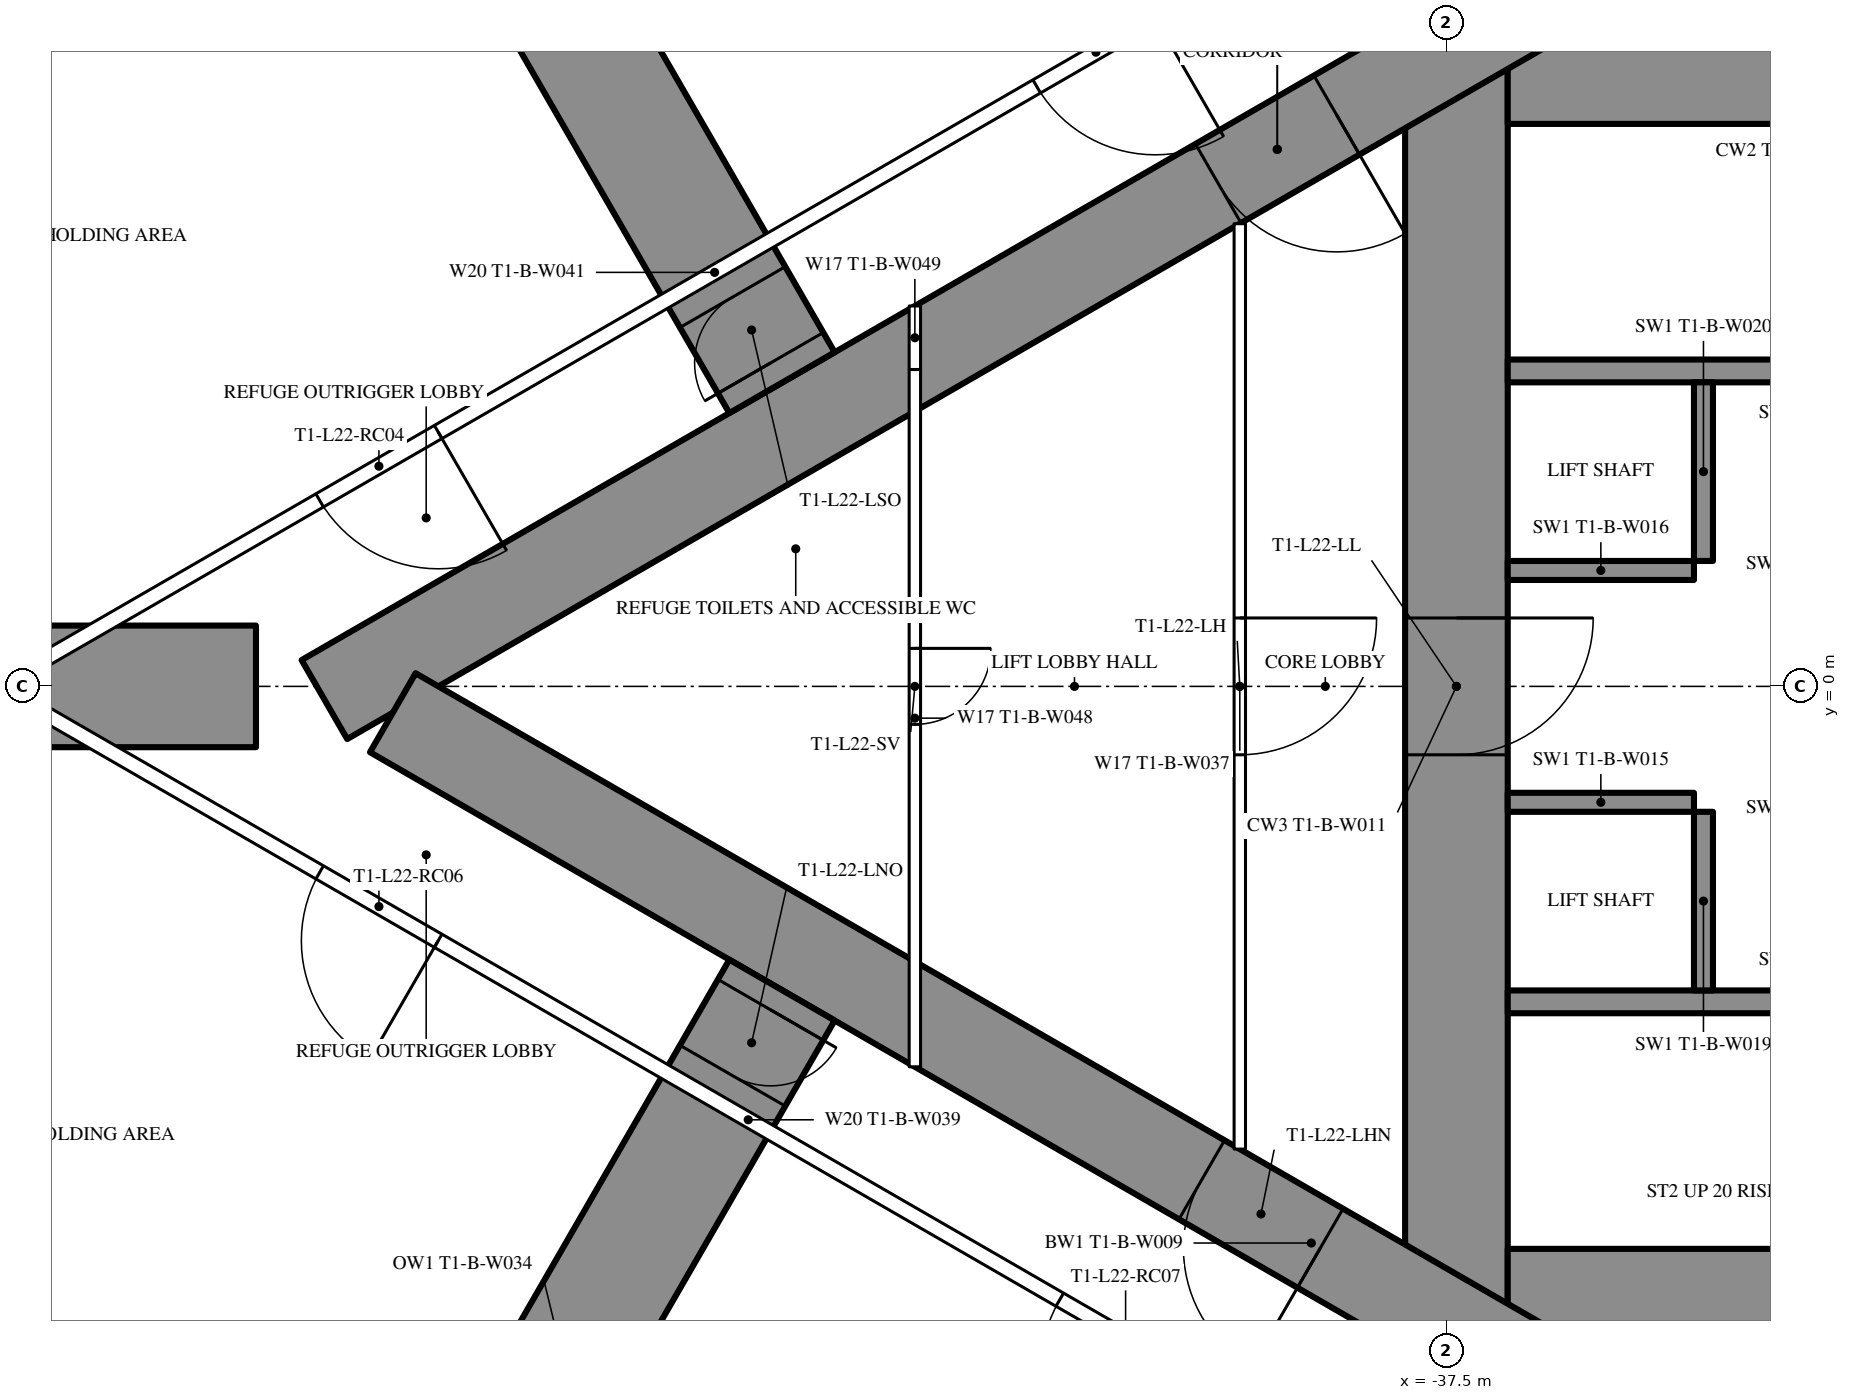
"""IFC4 building model, lengths in metres.
Left out: names, types, materials, properties, quantities, classifications, styles, units other than length and angle.
Written with IfcOpenShell. Run it as: python <this file> out.ifc"""

import sys

from ifc_helpers import new_model, si_unit, direction, frame, frame_2d, origin, place, context, subcontext, project, spatial, rectangle, extrude, element, fill, save


model = new_model("IFC4")
c1 = context("Model", 3, precision=1e-05, world=origin(), true_north=direction((0.0, 1.0)))
c2 = subcontext(c1, "Body", "Model", "MODEL_VIEW")
j1 = project(units=[si_unit("LENGTHUNIT", "METRE"), si_unit("PLANEANGLEUNIT", "RADIAN")], contexts=[c1])
p1 = place(None, origin())
s1 = spatial("IfcSite", under=j1, at=p1, CompositionType="ELEMENT")
p2 = place(p1, origin())
s2 = spatial("IfcBuilding", under=s1, at=p2, CompositionType="ELEMENT")
p3 = place(p2, frame((0.0, 0.0, 87.0)))
s3 = spatial("IfcBuildingStorey", under=s2, at=p3, CompositionType="ELEMENT", Elevation=87.0)
p4 = place(p3, frame((-37.375, 8.6, 0.0), z_axis=(0.0, 0.0, 1.0), x_axis=(0.0, -1.0, 0.0)))
e1 = element("IfcWall", 1, at=p4, inside=s3, PredefinedType="SHEAR", context=c2, shape_type="SweptSolid", body=[
    extrude(rectangle(XDim=17.2, YDim=1.35, at=frame_2d((8.6, 0.0))), origin(), (0.0, 0.0, 1.0), 3.6),
])
p5 = place(p4, frame((7.7, 0.0, 0.0)))
e2 = element("IfcOpeningElement", 2, at=p5, cuts=e1, PredefinedType="OPENING", context=c2, shape_type="SweptSolid", body=[
    extrude(rectangle(XDim=1.8, YDim=2.2, at=frame_2d((0.9, 1.1))), frame((0.0, 0.685, 0.0), z_axis=(0.0, -1.0, 0.0), x_axis=(1.0, 0.0, 0.0)), (0.0, 0.0, 1.0), 1.37),
])
p6 = place(p3, frame((-28.3, 8.0, 0.0), z_axis=(0.0, 0.0, 1.0), x_axis=(-1.0, 0.0, 0.0)))
e3 = element("IfcWall", 3, at=p6, inside=s3, PredefinedType="SHEAR", context=c2, shape_type="SweptSolid", body=[
    extrude(rectangle(XDim=8.4, YDim=1.2, at=frame_2d((4.2, 0.0))), origin(), (0.0, 0.0, 1.0), 3.6),
])
p7 = place(p6, frame((0.25, 0.0, 0.0)))
e4 = element("IfcOpeningElement", 4, at=p7, cuts=e3, PredefinedType="OPENING", context=c2, shape_type="SweptSolid", body=[
    extrude(rectangle(XDim=1.0, YDim=2.2, at=frame_2d((0.5, 1.1))), frame((0.0, 0.61, 0.0), z_axis=(0.0, -1.0, 0.0), x_axis=(1.0, 0.0, 0.0)), (0.0, 0.0, 1.0), 1.22),
])
p8 = place(p3, frame((-28.3, -8.0, 0.0), z_axis=(0.0, 0.0, 1.0), x_axis=(-1.0, 0.0, 0.0)))
e5 = element("IfcWall", 5, at=p8, inside=s3, PredefinedType="SHEAR", context=c2, shape_type="SweptSolid", body=[
    extrude(rectangle(XDim=8.4, YDim=1.2, at=frame_2d((4.2, 0.0))), origin(), (0.0, 0.0, 1.0), 3.6),
])
p9 = place(p8, frame((0.25, 0.0, 0.0)))
e6 = element("IfcOpeningElement", 6, at=p9, cuts=e5, PredefinedType="OPENING", context=c2, shape_type="SweptSolid", body=[
    extrude(rectangle(XDim=1.0, YDim=2.2, at=frame_2d((0.5, 1.1))), frame((0.0, 0.61, 0.0), z_axis=(0.0, -1.0, 0.0), x_axis=(1.0, 0.0, 0.0)), (0.0, 0.0, 1.0), 1.22),
])
for number, where, z_axis, x_axis in (
    (7, (-28.3, 4.15, 0.0), (0.0, 0.0, 1.0), (-1.0, 0.0, 0.0)),
    (8, (-28.3, -4.15, 0.0), (0.0, 0.0, 1.0), (-1.0, 0.0, 0.0)),
):
    element("IfcWall", number, at=place(p3, frame(where, z_axis=z_axis, x_axis=x_axis)), inside=s3, PredefinedType="SHEAR", context=c2, shape_type="SweptSolid", body=[
        extrude(rectangle(XDim=8.4, YDim=0.3, at=frame_2d((4.2, 0.0))), origin(), (0.0, 0.0, 1.0), 3.6),
    ])
p10 = place(p3, frame((-34.125, 4.0, 0.0), z_axis=(0.0, 0.0, 1.0), x_axis=(0.0, -1.0, 0.0)))
e9 = element("IfcWall", 9, at=p10, inside=s3, PredefinedType="SHEAR", context=c2, shape_type="SweptSolid", body=[
    extrude(rectangle(XDim=2.35, YDim=0.25, at=frame_2d((1.175, 0.0))), origin(), (0.0, 0.0, 1.0), 3.6),
])
p11 = place(p3, frame((-34.25, 1.525, 0.0), z_axis=(0.0, 0.0, 1.0), x_axis=(-1.0, 0.0, 0.0)))
e10 = element("IfcWall", 10, at=p11, inside=s3, PredefinedType="SHEAR", context=c2, shape_type="SweptSolid", body=[
    extrude(rectangle(XDim=2.45, YDim=0.25, at=frame_2d((1.225, 0.0))), origin(), (0.0, 0.0, 1.0), 3.6),
])
p12 = place(p3, frame((-34.125, -1.65, 0.0), z_axis=(0.0, 0.0, 1.0), x_axis=(0.0, -1.0, 0.0)))
e11 = element("IfcWall", 11, at=p12, inside=s3, PredefinedType="SHEAR", context=c2, shape_type="SweptSolid", body=[
    extrude(rectangle(XDim=2.35, YDim=0.25, at=frame_2d((1.175, 0.0))), origin(), (0.0, 0.0, 1.0), 3.6),
])
p13 = place(p3, frame((-34.25, -1.525, 0.0), z_axis=(0.0, 0.0, 1.0), x_axis=(-1.0, 0.0, 0.0)))
e12 = element("IfcWall", 12, at=p13, inside=s3, PredefinedType="SHEAR", context=c2, shape_type="SweptSolid", body=[
    extrude(rectangle(XDim=2.45, YDim=0.25, at=frame_2d((1.225, 0.0))), origin(), (0.0, 0.0, 1.0), 3.6),
])
p14 = place(p3, frame((-27.2, 14.3, 0.0), z_axis=(0.0, 0.0, 1.0), x_axis=(-0.866026593062, -0.499997940104, 0.0)))
e13 = element("IfcWall", 13, at=p14, inside=s3, PredefinedType="SHEAR", context=c2, shape_type="SweptSolid", body=[
    extrude(rectangle(XDim=28.946, YDim=1.2, at=frame_2d((14.473, 0.0))), origin(), (0.0, 0.0, 1.0), 3.6),
])
p15 = place(p14, frame((4.6, 0.0, 0.0)))
e14 = element("IfcOpeningElement", 14, at=p15, cuts=e13, PredefinedType="OPENING", context=c2, shape_type="SweptSolid", body=[
    extrude(rectangle(XDim=1.0, YDim=2.2, at=frame_2d((0.5, 1.1))), frame((0.0, 0.61, 0.0), z_axis=(0.0, -1.0, 0.0), x_axis=(1.0, 0.0, 0.0)), (0.0, 0.0, 1.0), 1.22),
])
p16 = place(p14, frame((13.568, 0.0, 0.0)))
e15 = element("IfcOpeningElement", 15, at=p16, cuts=e13, PredefinedType="OPENING", context=c2, shape_type="SweptSolid", body=[
    extrude(rectangle(XDim=1.8, YDim=2.03, at=frame_2d((0.9, 1.015))), frame((0.0, 0.61, 0.0), z_axis=(0.0, -1.0, 0.0), x_axis=(1.0, 0.0, 0.0)), (0.0, 0.0, 1.0), 1.22),
])
p17 = place(p3, frame((-27.2, -14.3, 0.0), z_axis=(0.0, 0.0, 1.0), x_axis=(-0.866024021859, 0.500002393557, 0.0)))
e16 = element("IfcWall", 16, at=p17, inside=s3, PredefinedType="SHEAR", context=c2, shape_type="SweptSolid", body=[
    extrude(rectangle(XDim=27.907, YDim=1.2, at=frame_2d((13.954, 0.0))), origin(), (0.0, 0.0, 1.0), 3.6),
])
p18 = place(p17, frame((4.6, 0.0, 0.0)))
e17 = element("IfcOpeningElement", 17, at=p18, cuts=e16, PredefinedType="OPENING", context=c2, shape_type="SweptSolid", body=[
    extrude(rectangle(XDim=1.0, YDim=2.2, at=frame_2d((0.5, 1.1))), frame((0.0, 0.61, 0.0), z_axis=(0.0, -1.0, 0.0), x_axis=(1.0, 0.0, 0.0)), (0.0, 0.0, 1.0), 1.22),
])
p19 = place(p17, frame((13.818, 0.0, 0.0)))
e18 = element("IfcOpeningElement", 18, at=p19, cuts=e16, PredefinedType="OPENING", context=c2, shape_type="SweptSolid", body=[
    extrude(rectangle(XDim=1.8, YDim=2.2, at=frame_2d((0.9, 1.1))), frame((0.0, 0.61, 0.0), z_axis=(0.0, -1.0, 0.0), x_axis=(1.0, 0.0, 0.0)), (0.0, 0.0, 1.0), 1.22),
])
p20 = place(p3, frame((-46.248, 3.996, 0.0), z_axis=(0.0, 0.0, 1.0), x_axis=(-0.499993613132, 0.866029091213, 0.0)))
e19 = element("IfcWall", 19, at=p20, inside=s3, PredefinedType="SHEAR", context=c2, shape_type="SweptSolid", body=[
    extrude(rectangle(XDim=11.431, YDim=1.6, at=frame_2d((5.715, 0.0))), origin(), (0.0, 0.0, 1.0), 3.6),
])
p21 = place(p20, frame((0.3, 0.0, 0.0)))
e20 = element("IfcOpeningElement", 20, at=p21, cuts=e19, PredefinedType="OPENING", context=c2, shape_type="SweptSolid", body=[
    extrude(rectangle(XDim=1.0, YDim=2.2, at=frame_2d((0.5, 1.1))), frame((0.0, 0.81, 0.0), z_axis=(0.0, -1.0, 0.0), x_axis=(1.0, 0.0, 0.0)), (0.0, 0.0, 1.0), 1.62),
])
p22 = place(p3, frame((-53.168, 0.0, 0.0), z_axis=(0.0, 0.0, 1.0), x_axis=(-1.0, 0.0, 0.0)))
e21 = element("IfcWall", 21, at=p22, inside=s3, PredefinedType="SHEAR", context=c2, shape_type="SweptSolid", body=[
    extrude(rectangle(XDim=8.332, YDim=1.6, at=frame_2d((4.166, 0.0))), origin(), (0.0, 0.0, 1.0), 3.6),
])
p23 = place(p3, frame((-46.248, -3.996, 0.0), z_axis=(0.0, 0.0, 1.0), x_axis=(-0.499993613132, -0.866029091213, 0.0)))
e22 = element("IfcWall", 22, at=p23, inside=s3, PredefinedType="SHEAR", context=c2, shape_type="SweptSolid", body=[
    extrude(rectangle(XDim=11.431, YDim=1.6, at=frame_2d((5.715, 0.0))), origin(), (0.0, 0.0, 1.0), 3.6),
])
p24 = place(p23, frame((0.3, 0.0, 0.0)))
e23 = element("IfcOpeningElement", 23, at=p24, cuts=e22, PredefinedType="OPENING", context=c2, shape_type="SweptSolid", body=[
    extrude(rectangle(XDim=1.0, YDim=2.2, at=frame_2d((0.5, 1.1))), frame((0.0, 0.81, 0.0), z_axis=(0.0, -1.0, 0.0), x_axis=(1.0, 0.0, 0.0)), (0.0, 0.0, 1.0), 1.62),
])
p25 = place(p3, frame((-51.963, 13.895, 0.0), z_axis=(0.0, 0.0, 1.0), x_axis=(-0.848062521637, -0.529896177939, 0.0)))
e24 = element("IfcWall", 24, at=p25, inside=s3, PredefinedType="SHEAR", context=c2, shape_type="SweptSolid", body=[
    extrude(rectangle(XDim=12.173, YDim=1.4, at=frame_2d((6.086, 0.0))), origin(), (0.0, 0.0, 1.0), 3.6),
])
p26 = place(p25, frame((4.586, 0.0, 0.6)))
e25 = element("IfcOpeningElement", 25, at=p26, cuts=e24, PredefinedType="OPENING", context=c2, shape_type="SweptSolid", body=[
    extrude(rectangle(XDim=3.0, YDim=1.2, at=frame_2d((1.5, 0.6))), frame((0.0, 0.71, 0.0), z_axis=(0.0, -1.0, 0.0), x_axis=(1.0, 0.0, 0.0)), (0.0, 0.0, 1.0), 1.42),
])
p27 = place(p3, frame((-62.287, -7.445, 0.0), z_axis=(0.0, 0.0, 1.0), x_axis=(0.848062521637, -0.529896177939, 0.0)))
e26 = element("IfcWall", 26, at=p27, inside=s3, PredefinedType="SHEAR", context=c2, shape_type="SweptSolid", body=[
    extrude(rectangle(XDim=12.173, YDim=1.4, at=frame_2d((6.086, 0.0))), origin(), (0.0, 0.0, 1.0), 3.6),
])
p28 = place(p27, frame((4.586, 0.0, 0.6)))
e27 = element("IfcOpeningElement", 27, at=p28, cuts=e26, PredefinedType="OPENING", context=c2, shape_type="SweptSolid", body=[
    extrude(rectangle(XDim=3.0, YDim=1.2, at=frame_2d((1.5, 0.6))), frame((0.0, 0.71, 0.0), z_axis=(0.0, -1.0, 0.0), x_axis=(1.0, 0.0, 0.0)), (0.0, 0.0, 1.0), 1.42),
])
p29 = place(p3, frame((-37.7, 10.894, 0.0), z_axis=(0.0, 0.0, 1.0), x_axis=(-0.866027905338, -0.499995667157, 0.0)))
e28 = element("IfcWall", 28, at=p29, inside=s3, PredefinedType="PARTITIONING", context=c2, shape_type="SweptSolid", body=[
    extrude(rectangle(XDim=21.787, YDim=0.2, at=frame_2d((10.894, 0.0))), origin(), (0.0, 0.0, 1.0), 3.35),
])
p30 = place(p29, frame((15.094, 0.0, 0.0)))
e29 = element("IfcOpeningElement", 29, at=p30, cuts=e28, PredefinedType="OPENING", context=c2, shape_type="SweptSolid", body=[
    extrude(rectangle(XDim=1.8, YDim=2.2, at=frame_2d((0.9, 1.1))), frame((0.0, 0.11, 0.0), z_axis=(0.0, -1.0, 0.0), x_axis=(1.0, 0.0, 0.0)), (0.0, 0.0, 1.0), 0.22),
])
p31 = place(p29, frame((4.201, 0.0, 0.0)))
e30 = element("IfcOpeningElement", 30, at=p31, cuts=e28, PredefinedType="OPENING", context=c2, shape_type="SweptSolid", body=[
    extrude(rectangle(XDim=1.8, YDim=2.2, at=frame_2d((0.9, 1.1))), frame((0.0, 0.11, 0.0), z_axis=(0.0, -1.0, 0.0), x_axis=(1.0, 0.0, 0.0)), (0.0, 0.0, 1.0), 0.22),
])
p32 = place(p3, frame((-36.92, -11.344, 0.0), z_axis=(0.0, 0.0, 1.0), x_axis=(-0.866028313256, 0.499994960614, 0.0)))
e31 = element("IfcWall", 31, at=p32, inside=s3, PredefinedType="PARTITIONING", context=c2, shape_type="SweptSolid", body=[
    extrude(rectangle(XDim=22.568, YDim=0.2, at=frame_2d((11.284, 0.0))), origin(), (0.0, 0.0, 1.0), 3.35),
])
p33 = place(p32, frame((15.994, 0.0, 0.0)))
e32 = element("IfcOpeningElement", 32, at=p33, cuts=e31, PredefinedType="OPENING", context=c2, shape_type="SweptSolid", body=[
    extrude(rectangle(XDim=1.8, YDim=2.2, at=frame_2d((0.9, 1.1))), frame((0.0, 0.11, 0.0), z_axis=(0.0, -1.0, 0.0), x_axis=(1.0, 0.0, 0.0)), (0.0, 0.0, 1.0), 0.22),
])
p34 = place(p32, frame((4.551, 0.0, 0.0)))
e33 = element("IfcOpeningElement", 33, at=p34, cuts=e31, PredefinedType="OPENING", context=c2, shape_type="SweptSolid", body=[
    extrude(rectangle(XDim=2.0, YDim=2.4, at=frame_2d((1.0, 1.2))), frame((0.0, 0.11, 0.0), z_axis=(0.0, -1.0, 0.0), x_axis=(1.0, 0.0, 0.0)), (0.0, 0.0, 1.0), 0.22),
])
p35 = place(p3, frame((-40.225, 6.087, 0.0), z_axis=(0.0, 0.0, 1.0), x_axis=(0.0, -1.0, 0.0)))
e34 = element("IfcWall", 34, at=p35, inside=s3, PredefinedType="PARTITIONING", context=c2, shape_type="SweptSolid", body=[
    extrude(rectangle(XDim=12.174, YDim=0.15, at=frame_2d((6.087, 0.0))), origin(), (0.0, 0.0, 1.0), 3.35),
])
p36 = place(p35, frame((5.187, 0.0, 0.0)))
e35 = element("IfcOpeningElement", 35, at=p36, cuts=e34, PredefinedType="OPENING", context=c2, shape_type="SweptSolid", body=[
    extrude(rectangle(XDim=1.8, YDim=2.2, at=frame_2d((0.9, 1.1))), frame((0.0, 0.085, 0.0), z_axis=(0.0, -1.0, 0.0), x_axis=(1.0, 0.0, 0.0)), (0.0, 0.0, 1.0), 0.17),
])
p37 = place(p3, frame((-44.5, 4.169, 0.0), z_axis=(0.0, 0.0, 1.0), x_axis=(0.0, -1.0, 0.0)))
e36 = element("IfcWall", 36, at=p37, inside=s3, PredefinedType="PARTITIONING", context=c2, shape_type="SweptSolid", body=[
    extrude(rectangle(XDim=9.173, YDim=0.15, at=frame_2d((4.587, 0.0))), origin(), (0.0, 0.0, 1.0), 3.35),
])
p38 = place(p37, frame((3.669, 0.0, 0.0)))
e37 = element("IfcOpeningElement", 37, at=p38, cuts=e36, PredefinedType="OPENING", context=c2, shape_type="SweptSolid", body=[
    extrude(rectangle(XDim=1.0, YDim=2.2, at=frame_2d((0.5, 1.1))), frame((0.0, 0.085, 0.0), z_axis=(0.0, -1.0, 0.0), x_axis=(1.0, 0.0, 0.0)), (0.0, 0.0, 1.0), 0.17),
])
p39 = place(p3, frame((-44.5, 5.005, 0.0), z_axis=(0.0, 0.0, 1.0), x_axis=(0.0, -1.0, 0.0)))
e38 = element("IfcWall", 38, at=p39, inside=s3, PredefinedType="PARTITIONING", context=c2, shape_type="SweptSolid", body=[
    extrude(rectangle(XDim=0.836, YDim=0.15, at=frame_2d((0.418, 0.0))), origin(), (0.0, 0.0, 1.0), 2.05),
])
p40 = place(p21, origin())
e39 = element("IfcDoor", 39, at=p40, inside=s3, OperationType="SINGLE_SWING_LEFT", PredefinedType="DOOR", context=c2, shape_type="SweptSolid", body=[
    extrude(rectangle(XDim=1.0, YDim=2.2, at=frame_2d((0.5, 1.1))), frame((0.0, 0.025, 0.0), z_axis=(0.0, -1.0, 0.0), x_axis=(1.0, 0.0, 0.0)), (0.0, 0.0, 1.0), 0.05),
])
fill(e20, e39)
p41 = place(p24, origin())
e40 = element("IfcDoor", 40, at=p41, inside=s3, OperationType="SINGLE_SWING_LEFT", PredefinedType="DOOR", context=c2, shape_type="SweptSolid", body=[
    extrude(rectangle(XDim=1.0, YDim=2.2, at=frame_2d((0.5, 1.1))), frame((0.0, 0.025, 0.0), z_axis=(0.0, -1.0, 0.0), x_axis=(1.0, 0.0, 0.0)), (0.0, 0.0, 1.0), 0.05),
])
fill(e23, e40)
p42 = place(p30, origin())
e41 = element("IfcDoor", 41, at=p42, inside=s3, OperationType="DOUBLE_DOOR_SINGLE_SWING", PredefinedType="DOOR", context=c2, shape_type="SweptSolid", body=[
    extrude(rectangle(XDim=1.8, YDim=2.2, at=frame_2d((0.9, 1.1))), frame((0.0, 0.025, 0.0), z_axis=(0.0, -1.0, 0.0), x_axis=(1.0, 0.0, 0.0)), (0.0, 0.0, 1.0), 0.05),
])
fill(e29, e41)
p43 = place(p33, origin())
e42 = element("IfcDoor", 42, at=p43, inside=s3, OperationType="DOUBLE_DOOR_SINGLE_SWING", PredefinedType="DOOR", context=c2, shape_type="SweptSolid", body=[
    extrude(rectangle(XDim=1.8, YDim=2.2, at=frame_2d((0.9, 1.1))), frame((0.0, 0.025, 0.0), z_axis=(0.0, -1.0, 0.0), x_axis=(1.0, 0.0, 0.0)), (0.0, 0.0, 1.0), 0.05),
])
fill(e32, e42)
p44 = place(p31, origin())
e43 = element("IfcDoor", 43, at=p44, inside=s3, OperationType="DOUBLE_DOOR_SINGLE_SWING", PredefinedType="DOOR", context=c2, shape_type="SweptSolid", body=[
    extrude(rectangle(XDim=1.8, YDim=2.2, at=frame_2d((0.9, 1.1))), frame((0.0, 0.025, 0.0), z_axis=(0.0, -1.0, 0.0), x_axis=(1.0, 0.0, 0.0)), (0.0, 0.0, 1.0), 0.05),
])
fill(e30, e43)
p45 = place(p34, origin())
e44 = element("IfcDoor", 44, at=p45, inside=s3, OperationType="DOUBLE_DOOR_SINGLE_SWING", PredefinedType="DOOR", context=c2, shape_type="SweptSolid", body=[
    extrude(rectangle(XDim=2.0, YDim=2.4, at=frame_2d((1.0, 1.2))), frame((0.0, 0.025, 0.0), z_axis=(0.0, -1.0, 0.0), x_axis=(1.0, 0.0, 0.0)), (0.0, 0.0, 1.0), 0.05),
])
fill(e33, e44)
p46 = place(p36, origin())
e45 = element("IfcDoor", 45, at=p46, inside=s3, OperationType="DOUBLE_DOOR_SINGLE_SWING", PredefinedType="DOOR", context=c2, shape_type="SweptSolid", body=[
    extrude(rectangle(XDim=1.8, YDim=2.2, at=frame_2d((0.9, 1.1))), frame((0.0, 0.025, 0.0), z_axis=(0.0, -1.0, 0.0), x_axis=(1.0, 0.0, 0.0)), (0.0, 0.0, 1.0), 0.05),
])
fill(e35, e45)
p47 = place(p38, origin())
e46 = element("IfcDoor", 46, at=p47, inside=s3, OperationType="SINGLE_SWING_LEFT", PredefinedType="DOOR", context=c2, shape_type="SweptSolid", body=[
    extrude(rectangle(XDim=1.0, YDim=2.2, at=frame_2d((0.5, 1.1))), frame((0.0, 0.025, 0.0), z_axis=(0.0, -1.0, 0.0), x_axis=(1.0, 0.0, 0.0)), (0.0, 0.0, 1.0), 0.05),
])
fill(e37, e46)
p48 = place(p16, origin())
e47 = element("IfcDoor", 47, at=p48, inside=s3, OperationType="DOUBLE_DOOR_SINGLE_SWING", PredefinedType="DOOR", context=c2, shape_type="SweptSolid", body=[
    extrude(rectangle(XDim=1.8, YDim=2.03, at=frame_2d((0.9, 1.015))), frame((0.0, 0.025, 0.0), z_axis=(0.0, -1.0, 0.0), x_axis=(1.0, 0.0, 0.0)), (0.0, 0.0, 1.0), 0.05),
])
fill(e15, e47)
p49 = place(p19, origin())
e48 = element("IfcDoor", 48, at=p49, inside=s3, OperationType="DOUBLE_DOOR_SINGLE_SWING", PredefinedType="DOOR", context=c2, shape_type="SweptSolid", body=[
    extrude(rectangle(XDim=1.8, YDim=2.2, at=frame_2d((0.9, 1.1))), frame((0.0, 0.025, 0.0), z_axis=(0.0, -1.0, 0.0), x_axis=(1.0, 0.0, 0.0)), (0.0, 0.0, 1.0), 0.05),
])
fill(e18, e48)
p50 = place(p5, origin())
e49 = element("IfcDoor", 49, at=p50, inside=s3, OperationType="DOUBLE_DOOR_SINGLE_SWING", PredefinedType="DOOR", context=c2, shape_type="SweptSolid", body=[
    extrude(rectangle(XDim=1.8, YDim=2.2, at=frame_2d((0.9, 1.1))), frame((0.0, 0.025, 0.0), z_axis=(0.0, -1.0, 0.0), x_axis=(1.0, 0.0, 0.0)), (0.0, 0.0, 1.0), 0.05),
])
fill(e2, e49)
save(model, sys.argv[1])
